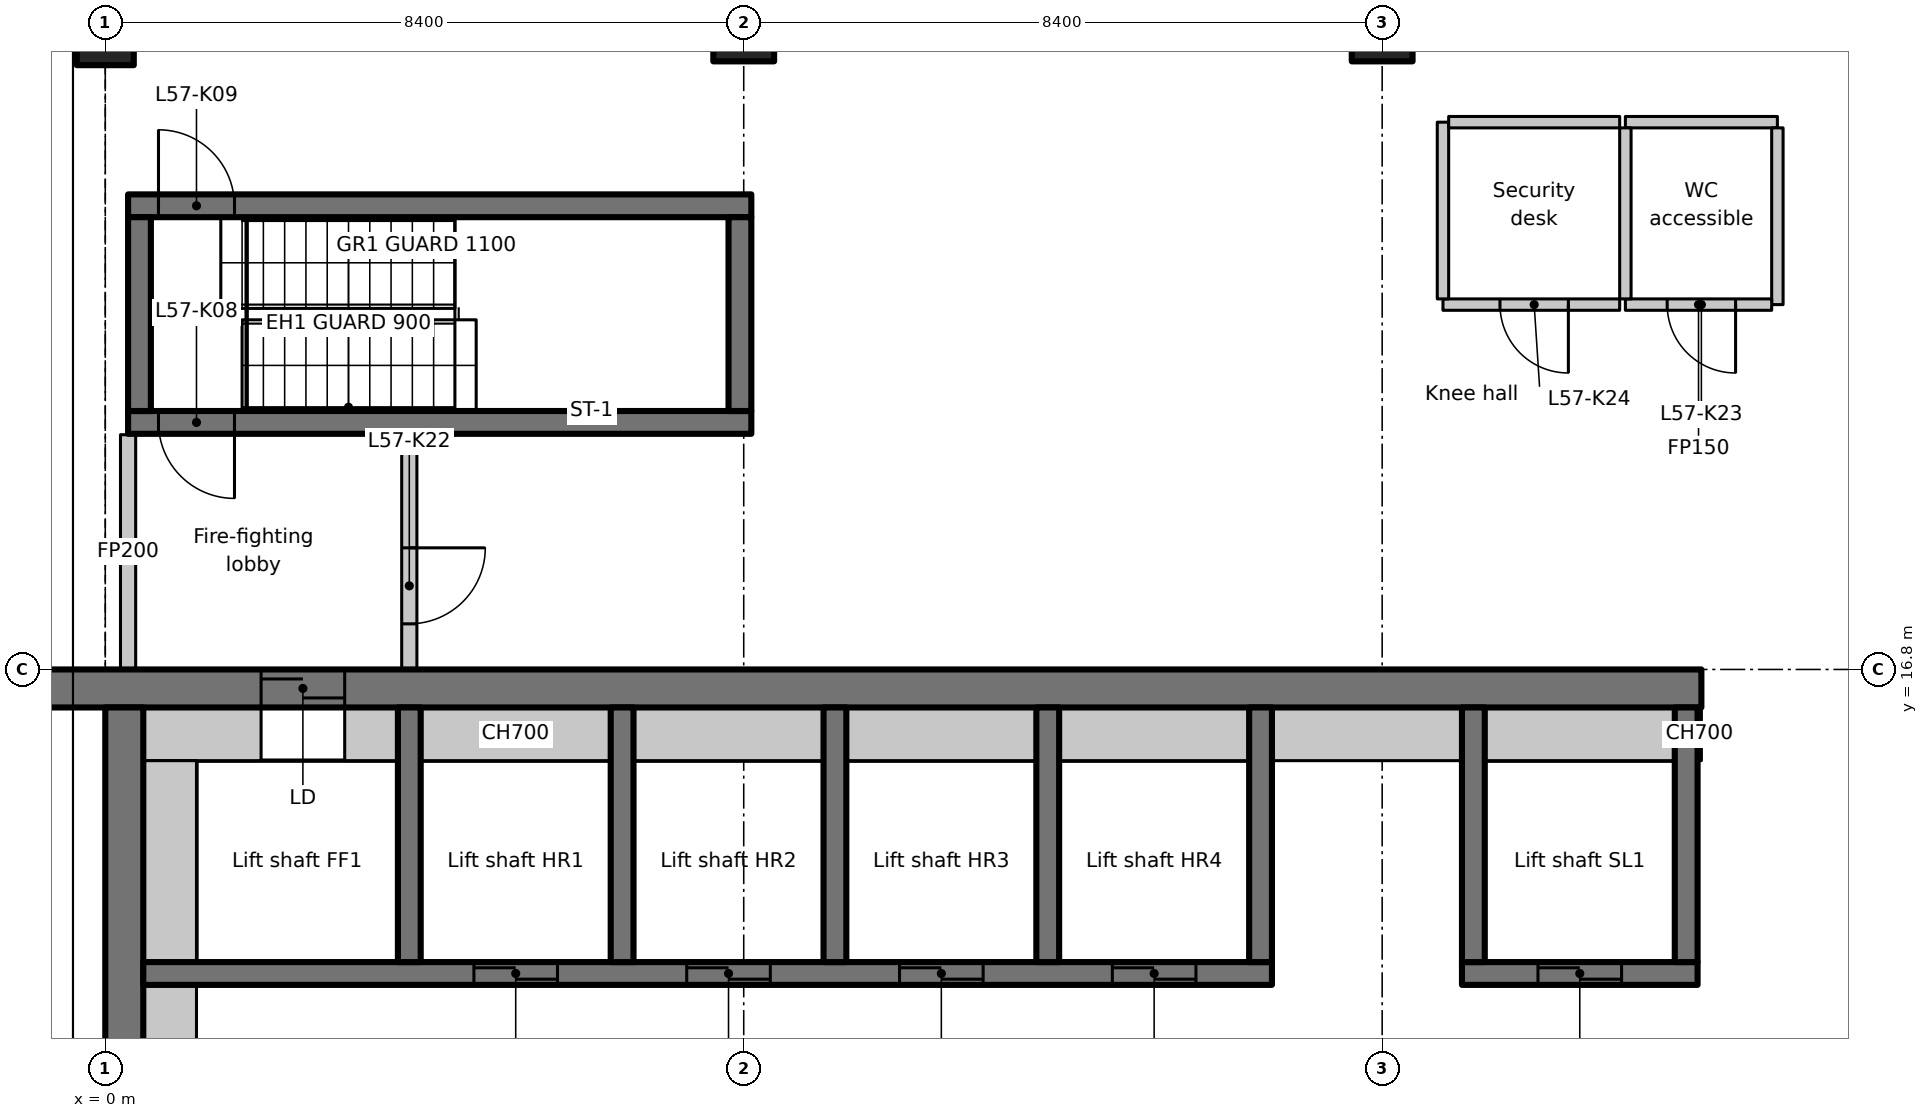
"""IFC4 building model, lengths in metres.
Left out: names, types, materials, properties, quantities, classifications, styles, units other than length and angle.
Written with IfcOpenShell. Run it as: python <this file> out.ifc"""

import sys

from ifc_helpers import new_model, si_unit, direction, frame, frame_2d, origin, origin_2d, place, context, subcontext, project, spatial, rectangle, extrude, element, fill, save


model = new_model("IFC4")
c1 = context("Model", 3, precision=1e-05, world=origin(), true_north=direction((0.0, 1.0)))
c2 = subcontext(c1, "Body", "Model", "MODEL_VIEW")
j1 = project(units=[si_unit("LENGTHUNIT", "METRE"), si_unit("PLANEANGLEUNIT", "RADIAN")], contexts=[c1])
p1 = place(None, origin())
s1 = spatial("IfcSite", under=j1, at=p1, CompositionType="ELEMENT")
p2 = place(p1, origin())
s2 = spatial("IfcBuilding", under=s1, at=p2, CompositionType="ELEMENT")
p3 = place(p2, frame((0.0, 0.0, 226.5)))
s3 = spatial("IfcBuildingStorey", under=s2, at=p3, CompositionType="ELEMENT", Elevation=226.5)
p4 = place(p3, frame((0.0, 25.2, 0.0), z_axis=(0.0, 0.0, 1.0), x_axis=(1.0, 0.0, 0.0)))
e1 = element("IfcColumn", 1, at=p4, inside=s3, PredefinedType="COLUMN", context=c2, shape_type="SweptSolid", body=[
    extrude(rectangle(XDim=0.75, YDim=0.9, at=origin_2d()), origin(), (0.0, 0.0, 1.0), 3.35),
])
for number, where, z_axis, x_axis in (
    (2, (8.4, 25.2, 0.0), (0.0, 0.0, 1.0), (1.0, 0.0, 0.0)),
    (3, (16.8, 25.2, 0.0), (0.0, 0.0, 1.0), (1.0, 0.0, 0.0)),
):
    element("IfcColumn", number, at=place(p3, frame(where, z_axis=z_axis, x_axis=x_axis)), inside=s3, PredefinedType="COLUMN", context=c2, shape_type="SweptSolid", body=[
        extrude(rectangle(XDim=0.8, YDim=0.8, at=origin_2d()), origin(), (0.0, 0.0, 1.0), 3.35),
    ])
p5 = place(p3, frame((-1.1, 16.55, 0.0), z_axis=(0.0, 0.0, 1.0), x_axis=(1.0, 0.0, 0.0)))
e4 = element("IfcWall", 4, at=p5, inside=s3, PredefinedType="SHEAR", context=c2, shape_type="SweptSolid", body=[
    extrude(rectangle(XDim=22.1, YDim=0.5, at=frame_2d((11.05, 0.0))), origin(), (0.0, 0.0, 1.0), 3.35),
])
p6 = place(p5, frame((3.15, 0.0, 0.0)))
e5 = element("IfcOpeningElement", 5, at=p6, cuts=e4, PredefinedType="OPENING", context=c2, shape_type="SweptSolid", body=[
    extrude(rectangle(XDim=1.1, YDim=2.3, at=frame_2d((0.55, 1.15))), frame((0.0, 0.26, 0.0), z_axis=(0.0, -1.0, 0.0), x_axis=(1.0, 0.0, 0.0)), (0.0, 0.0, 1.0), 0.52),
])
p7 = place(p3, frame((0.25, 7.436, 0.0), z_axis=(0.0, 0.0, 1.0), x_axis=(0.0, 1.0, 0.0)))
e6 = element("IfcWall", 6, at=p7, inside=s3, PredefinedType="SHEAR", context=c2, shape_type="SweptSolid", body=[
    extrude(rectangle(XDim=8.864, YDim=0.5, at=frame_2d((4.432, 0.0))), origin(), (0.0, 0.0, 1.0), 3.35),
])
p8 = place(p3, frame((0.5, 15.95, 0.0), z_axis=(0.0, 0.0, 1.0), x_axis=(1.0, 0.0, 0.0)))
e7 = element("IfcWall", 7, at=p8, inside=s3, PredefinedType="PARTITIONING", context=c2, shape_type="SweptSolid", body=[
    extrude(rectangle(XDim=1.55, YDim=0.7, at=frame_2d((0.775, 0.0))), origin(), (0.0, 0.0, 1.0), 3.35),
])
p9 = place(p3, frame((0.5, 12.8, 0.0), z_axis=(0.0, 0.0, 1.0), x_axis=(1.0, 0.0, 0.0)))
e8 = element("IfcWall", 8, at=p9, inside=s3, PredefinedType="SHEAR", context=c2, shape_type="SweptSolid", body=[
    extrude(rectangle(XDim=14.85, YDim=0.3, at=frame_2d((7.425, 0.0))), origin(), (0.0, 0.0, 1.0), 3.35),
])
p10 = place(p9, frame((4.35, 0.0, 0.0)))
e9 = element("IfcOpeningElement", 9, at=p10, cuts=e8, PredefinedType="OPENING", context=c2, shape_type="SweptSolid", body=[
    extrude(rectangle(XDim=1.1, YDim=2.3, at=frame_2d((0.55, 1.15))), frame((0.0, 0.16, 0.0), z_axis=(0.0, -1.0, 0.0), x_axis=(1.0, 0.0, 0.0)), (0.0, 0.0, 1.0), 0.32),
])
p11 = place(p9, frame((7.15, 0.0, 0.0)))
e10 = element("IfcOpeningElement", 10, at=p11, cuts=e8, PredefinedType="OPENING", context=c2, shape_type="SweptSolid", body=[
    extrude(rectangle(XDim=1.1, YDim=2.3, at=frame_2d((0.55, 1.15))), frame((0.0, 0.16, 0.0), z_axis=(0.0, -1.0, 0.0), x_axis=(1.0, 0.0, 0.0)), (0.0, 0.0, 1.0), 0.32),
])
p12 = place(p9, frame((9.95, 0.0, 0.0)))
e11 = element("IfcOpeningElement", 11, at=p12, cuts=e8, PredefinedType="OPENING", context=c2, shape_type="SweptSolid", body=[
    extrude(rectangle(XDim=1.1, YDim=2.3, at=frame_2d((0.55, 1.15))), frame((0.0, 0.16, 0.0), z_axis=(0.0, -1.0, 0.0), x_axis=(1.0, 0.0, 0.0)), (0.0, 0.0, 1.0), 0.32),
])
p13 = place(p9, frame((12.75, 0.0, 0.0)))
e12 = element("IfcOpeningElement", 12, at=p13, cuts=e8, PredefinedType="OPENING", context=c2, shape_type="SweptSolid", body=[
    extrude(rectangle(XDim=1.1, YDim=2.3, at=frame_2d((0.55, 1.15))), frame((0.0, 0.16, 0.0), z_axis=(0.0, -1.0, 0.0), x_axis=(1.0, 0.0, 0.0)), (0.0, 0.0, 1.0), 0.32),
])
for number, where, z_axis, x_axis in (
    (13, (4.0, 12.95, 0.0), (0.0, 0.0, 1.0), (0.0, 1.0, 0.0)),
    (14, (6.8, 12.95, 0.0), (0.0, 0.0, 1.0), (0.0, 1.0, 0.0)),
    (15, (9.6, 12.95, 0.0), (0.0, 0.0, 1.0), (0.0, 1.0, 0.0)),
    (16, (12.4, 12.95, 0.0), (0.0, 0.0, 1.0), (0.0, 1.0, 0.0)),
    (17, (15.2, 12.95, 0.0), (0.0, 0.0, 1.0), (0.0, 1.0, 0.0)),
):
    element("IfcWall", number, at=place(p3, frame(where, z_axis=z_axis, x_axis=x_axis)), inside=s3, PredefinedType="SHEAR", context=c2, shape_type="SweptSolid", body=[
        extrude(rectangle(XDim=3.35, YDim=0.3, at=frame_2d((1.675, 0.0))), origin(), (0.0, 0.0, 1.0), 3.35),
    ])
p14 = place(p3, frame((17.85, 12.8, 0.0), z_axis=(0.0, 0.0, 1.0), x_axis=(1.0, 0.0, 0.0)))
e18 = element("IfcWall", 18, at=p14, inside=s3, PredefinedType="SHEAR", context=c2, shape_type="SweptSolid", body=[
    extrude(rectangle(XDim=3.1, YDim=0.3, at=frame_2d((1.55, 0.0))), origin(), (0.0, 0.0, 1.0), 3.35),
])
p15 = place(p14, frame((1.0, 0.0, 0.0)))
e19 = element("IfcOpeningElement", 19, at=p15, cuts=e18, PredefinedType="OPENING", context=c2, shape_type="SweptSolid", body=[
    extrude(rectangle(XDim=1.1, YDim=2.3, at=frame_2d((0.55, 1.15))), frame((0.0, 0.16, 0.0), z_axis=(0.0, -1.0, 0.0), x_axis=(1.0, 0.0, 0.0)), (0.0, 0.0, 1.0), 0.32),
])
for number, where, z_axis, x_axis in (
    (20, (18.0, 12.95, 0.0), (0.0, 0.0, 1.0), (0.0, 1.0, 0.0)),
    (21, (20.8, 12.95, 0.0), (0.0, 0.0, 1.0), (0.0, 1.0, 0.0)),
):
    element("IfcWall", number, at=place(p3, frame(where, z_axis=z_axis, x_axis=x_axis)), inside=s3, PredefinedType="SHEAR", context=c2, shape_type="SweptSolid", body=[
        extrude(rectangle(XDim=3.35, YDim=0.3, at=frame_2d((1.675, 0.0))), origin(), (0.0, 0.0, 1.0), 3.35),
    ])
p16 = place(p3, frame((8.5, 20.05, 0.0), z_axis=(0.0, 0.0, 1.0), x_axis=(-1.0, 0.0, 0.0)))
e22 = element("IfcWall", 22, at=p16, inside=s3, PredefinedType="SHEAR", context=c2, shape_type="SweptSolid", body=[
    extrude(rectangle(XDim=8.2, YDim=0.3, at=frame_2d((4.1, 0.0))), origin(), (0.0, 0.0, 1.0), 3.35),
])
p17 = place(p16, frame((6.8, 0.0, 0.0)))
e23 = element("IfcOpeningElement", 23, at=p17, cuts=e22, PredefinedType="OPENING", context=c2, shape_type="SweptSolid", body=[
    extrude(rectangle(XDim=1.0, YDim=2.1, at=frame_2d((0.5, 1.05))), frame((0.0, 0.16, 0.0), z_axis=(0.0, -1.0, 0.0), x_axis=(1.0, 0.0, 0.0)), (0.0, 0.0, 1.0), 0.32),
])
p18 = place(p3, frame((0.3, 22.9, 0.0), z_axis=(0.0, 0.0, 1.0), x_axis=(1.0, 0.0, 0.0)))
e24 = element("IfcWall", 24, at=p18, inside=s3, PredefinedType="SHEAR", context=c2, shape_type="SweptSolid", body=[
    extrude(rectangle(XDim=8.2, YDim=0.3, at=frame_2d((4.1, 0.0))), origin(), (0.0, 0.0, 1.0), 3.35),
])
p19 = place(p18, frame((0.4, 0.0, 0.0)))
e25 = element("IfcOpeningElement", 25, at=p19, cuts=e24, PredefinedType="OPENING", context=c2, shape_type="SweptSolid", body=[
    extrude(rectangle(XDim=1.0, YDim=2.1, at=frame_2d((0.5, 1.05))), frame((0.0, 0.16, 0.0), z_axis=(0.0, -1.0, 0.0), x_axis=(1.0, 0.0, 0.0)), (0.0, 0.0, 1.0), 0.32),
])
for number, where, z_axis, x_axis in (
    (26, (0.45, 20.2, 0.0), (0.0, 0.0, 1.0), (0.0, 1.0, 0.0)),
    (27, (8.35, 20.2, 0.0), (0.0, 0.0, 1.0), (0.0, 1.0, 0.0)),
):
    element("IfcWall", number, at=place(p3, frame(where, z_axis=z_axis, x_axis=x_axis)), inside=s3, PredefinedType="SHEAR", context=c2, shape_type="SweptSolid", body=[
        extrude(rectangle(XDim=2.55, YDim=0.3, at=frame_2d((1.275, 0.0))), origin(), (0.0, 0.0, 1.0), 3.35),
    ])
p20 = place(p3, frame((0.3, 16.812, 0.0), z_axis=(0.0, 0.0, 1.0), x_axis=(0.0, 1.0, 0.0)))
e28 = element("IfcWall", 28, at=p20, inside=s3, PredefinedType="PARTITIONING", context=c2, shape_type="SweptSolid", body=[
    extrude(rectangle(XDim=3.076, YDim=0.2, at=frame_2d((1.538, 0.0))), origin(), (0.0, 0.0, 1.0), 2.98),
])
p21 = place(p3, frame((4.0, 19.888, 0.0), z_axis=(0.0, 0.0, 1.0), x_axis=(0.0, -1.0, 0.0)))
e29 = element("IfcWall", 29, at=p21, inside=s3, PredefinedType="PARTITIONING", context=c2, shape_type="SweptSolid", body=[
    extrude(rectangle(XDim=3.076, YDim=0.2, at=frame_2d((1.538, 0.0))), origin(), (0.0, 0.0, 1.0), 3.35),
])
p22 = place(p21, frame((1.488, 0.0, 0.0)))
e30 = element("IfcOpeningElement", 30, at=p22, cuts=e29, PredefinedType="OPENING", context=c2, shape_type="SweptSolid", body=[
    extrude(rectangle(XDim=1.0, YDim=2.1, at=frame_2d((0.5, 1.05))), frame((0.0, 0.11, 0.0), z_axis=(0.0, -1.0, 0.0), x_axis=(1.0, 0.0, 0.0)), (0.0, 0.0, 1.0), 0.22),
])
p23 = place(p3, frame((20.0, 24.0, 0.0), z_axis=(0.0, 0.0, 1.0), x_axis=(1.0, 0.0, 0.0)))
e31 = element("IfcWall", 31, at=p23, inside=s3, PredefinedType="PARTITIONING", context=c2, shape_type="SweptSolid", body=[
    extrude(rectangle(XDim=2.0, YDim=0.15, at=frame_2d((1.0, 0.0))), origin(), (0.0, 0.0, 1.0), 3.35),
])
p24 = place(p3, frame((22.0, 23.925, 0.0), z_axis=(0.0, 0.0, 1.0), x_axis=(0.0, -1.0, 0.0)))
e32 = element("IfcWall", 32, at=p24, inside=s3, PredefinedType="PARTITIONING", context=c2, shape_type="SweptSolid", body=[
    extrude(rectangle(XDim=2.325, YDim=0.15, at=frame_2d((1.163, 0.0))), origin(), (0.0, 0.0, 1.0), 3.35),
])
p25 = place(p3, frame((21.925, 21.6, 0.0), z_axis=(0.0, 0.0, 1.0), x_axis=(-1.0, 0.0, 0.0)))
e33 = element("IfcWall", 33, at=p25, inside=s3, PredefinedType="PARTITIONING", context=c2, shape_type="SweptSolid", body=[
    extrude(rectangle(XDim=1.925, YDim=0.15, at=frame_2d((0.962, 0.0))), origin(), (0.0, 0.0, 1.0), 3.35),
])
p26 = place(p25, frame((0.475, 0.0, 0.0)))
e34 = element("IfcOpeningElement", 34, at=p26, cuts=e33, PredefinedType="OPENING", context=c2, shape_type="SweptSolid", body=[
    extrude(rectangle(XDim=0.9, YDim=2.1, at=frame_2d((0.45, 1.05))), frame((0.0, 0.085, 0.0), z_axis=(0.0, -1.0, 0.0), x_axis=(1.0, 0.0, 0.0)), (0.0, 0.0, 1.0), 0.17),
])
p27 = place(p3, frame((20.0, 21.675, 0.0), z_axis=(0.0, 0.0, 1.0), x_axis=(0.0, 1.0, 0.0)))
e35 = element("IfcWall", 35, at=p27, inside=s3, PredefinedType="PARTITIONING", context=c2, shape_type="SweptSolid", body=[
    extrude(rectangle(XDim=2.25, YDim=0.15, at=frame_2d((1.125, 0.0))), origin(), (0.0, 0.0, 1.0), 3.35),
])
p28 = place(p3, frame((19.925, 21.6, 0.0), z_axis=(0.0, 0.0, 1.0), x_axis=(-1.0, 0.0, 0.0)))
e36 = element("IfcWall", 36, at=p28, inside=s3, PredefinedType="PARTITIONING", context=c2, shape_type="SweptSolid", body=[
    extrude(rectangle(XDim=2.325, YDim=0.15, at=frame_2d((1.163, 0.0))), origin(), (0.0, 0.0, 1.0), 3.35),
])
p29 = place(p28, frame((0.675, 0.0, 0.0)))
e37 = element("IfcOpeningElement", 37, at=p29, cuts=e36, PredefinedType="OPENING", context=c2, shape_type="SweptSolid", body=[
    extrude(rectangle(XDim=0.9, YDim=2.1, at=frame_2d((0.45, 1.05))), frame((0.0, 0.085, 0.0), z_axis=(0.0, -1.0, 0.0), x_axis=(1.0, 0.0, 0.0)), (0.0, 0.0, 1.0), 0.17),
])
p30 = place(p3, frame((17.6, 21.675, 0.0), z_axis=(0.0, 0.0, 1.0), x_axis=(0.0, 1.0, 0.0)))
e38 = element("IfcWall", 38, at=p30, inside=s3, PredefinedType="PARTITIONING", context=c2, shape_type="SweptSolid", body=[
    extrude(rectangle(XDim=2.325, YDim=0.15, at=frame_2d((1.163, 0.0))), origin(), (0.0, 0.0, 1.0), 3.35),
])
p31 = place(p3, frame((17.675, 24.0, 0.0), z_axis=(0.0, 0.0, 1.0), x_axis=(1.0, 0.0, 0.0)))
e39 = element("IfcWall", 39, at=p31, inside=s3, PredefinedType="PARTITIONING", context=c2, shape_type="SweptSolid", body=[
    extrude(rectangle(XDim=2.25, YDim=0.15, at=frame_2d((1.125, 0.0))), origin(), (0.0, 0.0, 1.0), 3.35),
])
p32 = place(p3, frame((0.85, 7.436, 0.0), z_axis=(0.0, 0.0, 1.0), x_axis=(0.0, 1.0, 0.0)))
e40 = element("IfcWall", 40, at=p32, inside=s3, PredefinedType="PARTITIONING", context=c2, shape_type="SweptSolid", body=[
    extrude(rectangle(XDim=5.214, YDim=0.7, at=frame_2d((2.607, 0.0))), origin(), (0.0, 0.0, 1.0), 3.35),
])
p33 = place(p3, frame((0.85, 12.95, 0.0), z_axis=(0.0, 0.0, 1.0), x_axis=(0.0, 1.0, 0.0)))
e41 = element("IfcWall", 41, at=p33, inside=s3, PredefinedType="PARTITIONING", context=c2, shape_type="SweptSolid", body=[
    extrude(rectangle(XDim=2.65, YDim=0.7, at=frame_2d((1.325, 0.0))), origin(), (0.0, 0.0, 1.0), 3.35),
])
p34 = place(p3, frame((3.15, 15.95, 0.0), z_axis=(0.0, 0.0, 1.0), x_axis=(1.0, 0.0, 0.0)))
e42 = element("IfcWall", 42, at=p34, inside=s3, PredefinedType="PARTITIONING", context=c2, shape_type="SweptSolid", body=[
    extrude(rectangle(XDim=0.7, YDim=0.7, at=frame_2d((0.35, 0.0))), origin(), (0.0, 0.0, 1.0), 3.35),
])
for number, where, z_axis, x_axis in (
    (43, (4.15, 15.95, 0.0), (0.0, 0.0, 1.0), (1.0, 0.0, 0.0)),
    (44, (6.95, 15.95, 0.0), (0.0, 0.0, 1.0), (1.0, 0.0, 0.0)),
    (45, (9.75, 15.95, 0.0), (0.0, 0.0, 1.0), (1.0, 0.0, 0.0)),
    (46, (12.55, 15.95, 0.0), (0.0, 0.0, 1.0), (1.0, 0.0, 0.0)),
    (47, (15.35, 15.95, 0.0), (0.0, 0.0, 1.0), (1.0, 0.0, 0.0)),
    (48, (18.15, 15.95, 0.0), (0.0, 0.0, 1.0), (1.0, 0.0, 0.0)),
):
    element("IfcWall", number, at=place(p3, frame(where, z_axis=z_axis, x_axis=x_axis)), inside=s3, PredefinedType="PARTITIONING", context=c2, shape_type="SweptSolid", body=[
        extrude(rectangle(XDim=2.5, YDim=0.7, at=frame_2d((1.25, 0.0))), origin(), (0.0, 0.0, 1.0), 3.35),
    ])
p35 = place(p3, frame((20.95, 15.95, 0.0), z_axis=(0.0, 0.0, 1.0), x_axis=(1.0, 0.0, 0.0)))
e49 = element("IfcWall", 49, at=p35, inside=s3, PredefinedType="PARTITIONING", context=c2, shape_type="SweptSolid", body=[
    extrude(rectangle(XDim=0.05, YDim=0.7, at=frame_2d((0.025, 0.0))), origin(), (0.0, 0.0, 1.0), 3.35),
])
p36 = place(p6, origin())
e50 = element("IfcDoor", 50, at=p36, inside=s3, OperationType="SLIDING_TO_LEFT", PredefinedType="DOOR", context=c2, shape_type="SweptSolid", body=[
    extrude(rectangle(XDim=1.1, YDim=2.3, at=frame_2d((0.55, 1.15))), frame((0.0, 0.025, 0.0), z_axis=(0.0, -1.0, 0.0), x_axis=(1.0, 0.0, 0.0)), (0.0, 0.0, 1.0), 0.05),
])
fill(e5, e50)
p37 = place(p10, origin())
e51 = element("IfcDoor", 51, at=p37, inside=s3, OperationType="SLIDING_TO_LEFT", PredefinedType="DOOR", context=c2, shape_type="SweptSolid", body=[
    extrude(rectangle(XDim=1.1, YDim=2.3, at=frame_2d((0.55, 1.15))), frame((0.0, 0.025, 0.0), z_axis=(0.0, -1.0, 0.0), x_axis=(1.0, 0.0, 0.0)), (0.0, 0.0, 1.0), 0.05),
])
fill(e9, e51)
p38 = place(p11, origin())
e52 = element("IfcDoor", 52, at=p38, inside=s3, OperationType="SLIDING_TO_LEFT", PredefinedType="DOOR", context=c2, shape_type="SweptSolid", body=[
    extrude(rectangle(XDim=1.1, YDim=2.3, at=frame_2d((0.55, 1.15))), frame((0.0, 0.025, 0.0), z_axis=(0.0, -1.0, 0.0), x_axis=(1.0, 0.0, 0.0)), (0.0, 0.0, 1.0), 0.05),
])
fill(e10, e52)
p39 = place(p12, origin())
e53 = element("IfcDoor", 53, at=p39, inside=s3, OperationType="SLIDING_TO_LEFT", PredefinedType="DOOR", context=c2, shape_type="SweptSolid", body=[
    extrude(rectangle(XDim=1.1, YDim=2.3, at=frame_2d((0.55, 1.15))), frame((0.0, 0.025, 0.0), z_axis=(0.0, -1.0, 0.0), x_axis=(1.0, 0.0, 0.0)), (0.0, 0.0, 1.0), 0.05),
])
fill(e11, e53)
p40 = place(p13, origin())
e54 = element("IfcDoor", 54, at=p40, inside=s3, OperationType="SLIDING_TO_LEFT", PredefinedType="DOOR", context=c2, shape_type="SweptSolid", body=[
    extrude(rectangle(XDim=1.1, YDim=2.3, at=frame_2d((0.55, 1.15))), frame((0.0, 0.025, 0.0), z_axis=(0.0, -1.0, 0.0), x_axis=(1.0, 0.0, 0.0)), (0.0, 0.0, 1.0), 0.05),
])
fill(e12, e54)
p41 = place(p15, origin())
e55 = element("IfcDoor", 55, at=p41, inside=s3, OperationType="SLIDING_TO_LEFT", PredefinedType="DOOR", context=c2, shape_type="SweptSolid", body=[
    extrude(rectangle(XDim=1.1, YDim=2.3, at=frame_2d((0.55, 1.15))), frame((0.0, 0.025, 0.0), z_axis=(0.0, -1.0, 0.0), x_axis=(1.0, 0.0, 0.0)), (0.0, 0.0, 1.0), 0.05),
])
fill(e19, e55)
p42 = place(p17, origin())
e56 = element("IfcDoor", 56, at=p42, inside=s3, OperationType="SINGLE_SWING_RIGHT", PredefinedType="DOOR", context=c2, shape_type="SweptSolid", body=[
    extrude(rectangle(XDim=1.0, YDim=2.1, at=frame_2d((0.5, 1.05))), frame((0.0, 0.025, 0.0), z_axis=(0.0, -1.0, 0.0), x_axis=(1.0, 0.0, 0.0)), (0.0, 0.0, 1.0), 0.05),
])
fill(e23, e56)
p43 = place(p19, origin())
e57 = element("IfcDoor", 57, at=p43, inside=s3, OperationType="SINGLE_SWING_LEFT", PredefinedType="DOOR", context=c2, shape_type="SweptSolid", body=[
    extrude(rectangle(XDim=1.0, YDim=2.1, at=frame_2d((0.5, 1.05))), frame((0.0, 0.025, 0.0), z_axis=(0.0, -1.0, 0.0), x_axis=(1.0, 0.0, 0.0)), (0.0, 0.0, 1.0), 0.05),
])
fill(e25, e57)
p44 = place(p22, origin())
e58 = element("IfcDoor", 58, at=p44, inside=s3, OperationType="SINGLE_SWING_RIGHT", PredefinedType="DOOR", context=c2, shape_type="SweptSolid", body=[
    extrude(rectangle(XDim=1.0, YDim=2.1, at=frame_2d((0.5, 1.05))), frame((0.0, 0.025, 0.0), z_axis=(0.0, -1.0, 0.0), x_axis=(1.0, 0.0, 0.0)), (0.0, 0.0, 1.0), 0.05),
])
fill(e30, e58)
p45 = place(p26, origin())
e59 = element("IfcDoor", 59, at=p45, inside=s3, OperationType="SINGLE_SWING_LEFT", PredefinedType="DOOR", context=c2, shape_type="SweptSolid", body=[
    extrude(rectangle(XDim=0.9, YDim=2.1, at=frame_2d((0.45, 1.05))), frame((0.0, 0.025, 0.0), z_axis=(0.0, -1.0, 0.0), x_axis=(1.0, 0.0, 0.0)), (0.0, 0.0, 1.0), 0.05),
])
fill(e34, e59)
p46 = place(p29, origin())
e60 = element("IfcDoor", 60, at=p46, inside=s3, OperationType="SINGLE_SWING_RIGHT", PredefinedType="DOOR", context=c2, shape_type="SweptSolid", body=[
    extrude(rectangle(XDim=0.9, YDim=2.1, at=frame_2d((0.45, 1.05))), frame((0.0, 0.025, 0.0), z_axis=(0.0, -1.0, 0.0), x_axis=(1.0, 0.0, 0.0)), (0.0, 0.0, 1.0), 0.05),
])
fill(e37, e60)
save(model, sys.argv[1])
